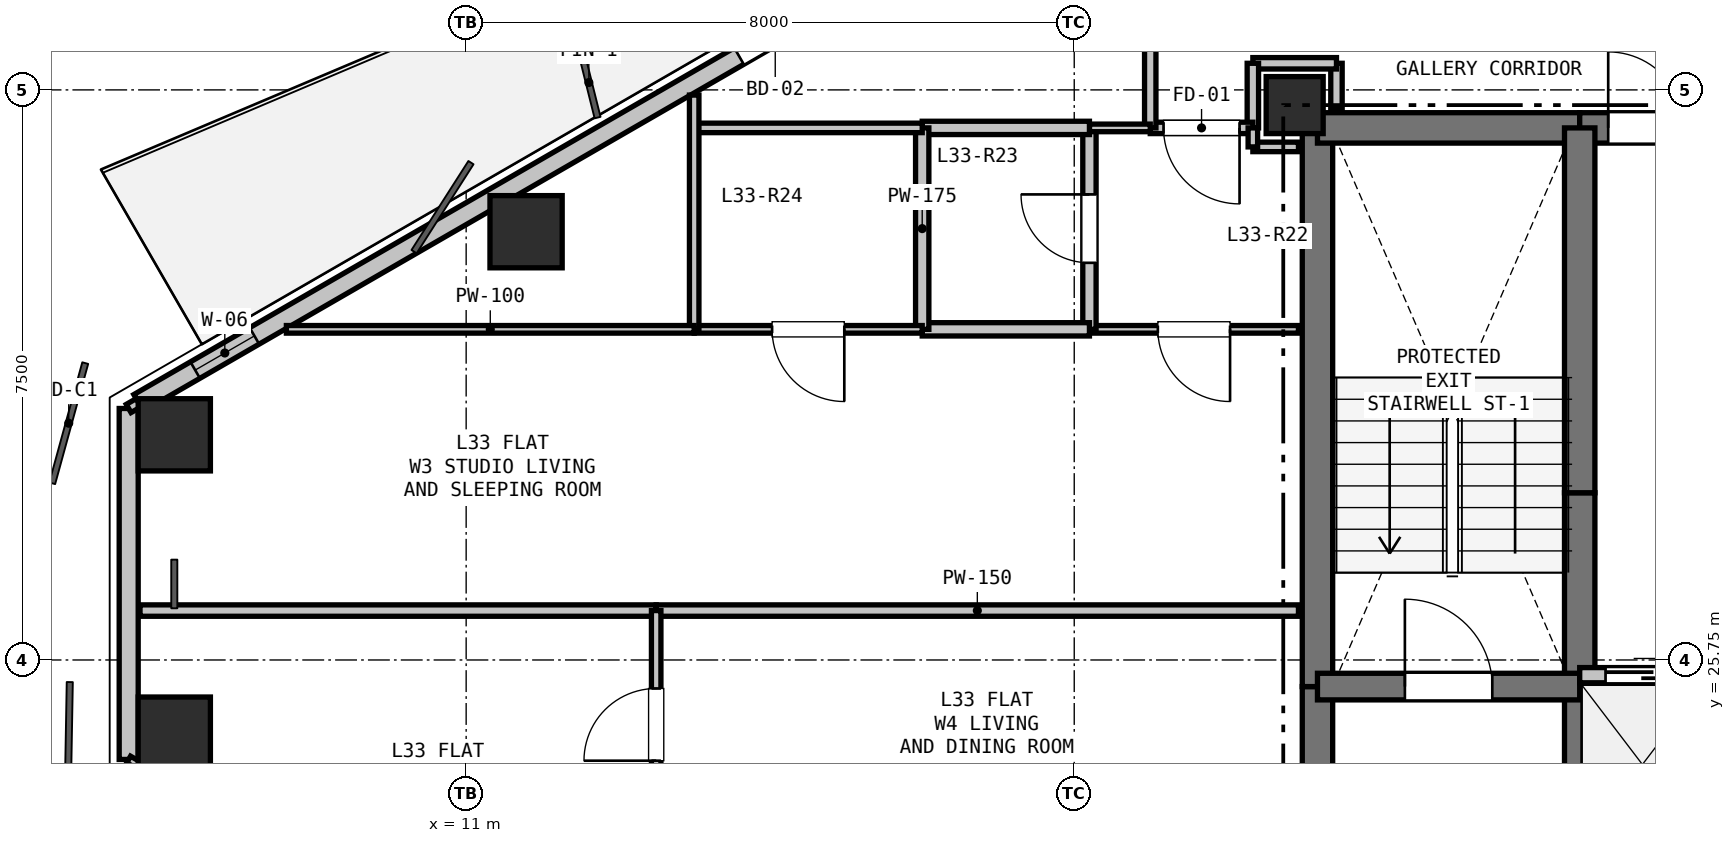
"""IFC4 building model, lengths in metres.
Left out: names, types, materials, properties, quantities, classifications, styles, units other than length and angle.
Written with IfcOpenShell. Run it as: python <this file> out.ifc"""

import sys

from ifc_helpers import new_model, si_unit, direction, frame, frame_2d, origin, origin_2d, place, context, subcontext, project, spatial, rectangle, hollow_rectangle, extrude, element, fill, save


model = new_model("IFC4")
c1 = context("Model", 3, precision=1e-05, world=origin(), true_north=direction((0.0, 1.0)))
c2 = subcontext(c1, "Body", "Model", "MODEL_VIEW")
j1 = project(units=[si_unit("LENGTHUNIT", "METRE"), si_unit("PLANEANGLEUNIT", "RADIAN")], contexts=[c1])
p1 = place(None, origin())
s1 = spatial("IfcSite", under=j1, at=p1, CompositionType="ELEMENT")
p2 = place(p1, origin())
s2 = spatial("IfcBuilding", under=s1, at=p2, CompositionType="ELEMENT")
p3 = place(p2, frame((0.0, 0.0, 121.2)))
s3 = spatial("IfcBuildingStorey", under=s2, at=p3, CompositionType="ELEMENT", Elevation=121.2)
p4 = place(p3, frame((21.9, 33.05, 0.0), z_axis=(0.0, 0.0, 1.0), x_axis=(1.0, 0.0, 0.0)))
e1 = element("IfcColumn", 1, at=p4, inside=s3, PredefinedType="COLUMN", context=c2, shape_type="SweptSolid", body=[
    extrude(rectangle(XDim=0.75, YDim=0.75, at=origin_2d()), origin(), (0.0, 0.0, 1.0), 3.3),
])
for number, where, z_axis, x_axis in (
    (2, (7.16, 28.712, -0.24), (0.0, 0.0, 1.0), (1.0, 0.0, 0.0)),
    (3, (11.788, 31.384, -0.24), (0.0, 0.0, 1.0), (1.0, 0.0, 0.0)),
    (4, (7.16, 24.788, -0.24), (0.0, 0.0, 1.0), (1.0, 0.0, 0.0)),
):
    element("IfcColumn", number, at=place(p3, frame(where, z_axis=z_axis, x_axis=x_axis)), inside=s3, PredefinedType="COLUMN", context=c2, shape_type="SweptSolid", body=[
        extrude(hollow_rectangle(XDim=0.95, YDim=0.95, WallThickness=0.028, at=origin_2d()), origin(), (0.0, 0.0, 1.0), 3.54),
    ])
p5 = place(p3, frame((6.56, 24.441, 0.0), z_axis=(0.0, 0.0, 1.0), x_axis=(0.0, 1.0, 0.0)))
e5 = element("IfcWall", 5, at=p5, inside=s3, PredefinedType="SOLIDWALL", context=c2, shape_type="SweptSolid", body=[
    extrude(rectangle(XDim=4.617, YDim=0.25, at=frame_2d((2.309, 0.0))), origin(), (0.0, 0.0, 1.0), 2.68),
])
p6 = place(p3, frame((6.69, 29.134, 0.0), z_axis=(0.0, 0.0, 1.0), x_axis=(0.866027848477, 0.499995765644, 0.0)))
e6 = element("IfcWall", 6, at=p6, inside=s3, PredefinedType="SOLIDWALL", context=c2, shape_type="SweptSolid", body=[
    extrude(rectangle(XDim=11.186, YDim=0.25, at=frame_2d((5.593, 0.0))), origin(), (0.0, 0.0, 1.0), 2.68),
])
p7 = place(p6, frame((9.122, 0.0, 0.0)))
e7 = element("IfcOpeningElement", 7, at=p7, cuts=e6, PredefinedType="OPENING", context=c2, shape_type="SweptSolid", body=[
    extrude(rectangle(XDim=1.1, YDim=2.1, at=frame_2d((0.55, 1.05))), frame((0.0, 0.135, 0.0), z_axis=(0.0, -1.0, 0.0), x_axis=(1.0, 0.0, 0.0)), (0.0, 0.0, 1.0), 0.27),
])
p8 = place(p6, frame((0.86, 0.0, 0.9)))
e8 = element("IfcOpeningElement", 8, at=p8, cuts=e6, PredefinedType="OPENING", context=c2, shape_type="SweptSolid", body=[
    extrude(rectangle(XDim=0.9, YDim=1.4, at=frame_2d((0.45, 0.7))), frame((0.0, 0.135, 0.0), z_axis=(0.0, -1.0, 0.0), x_axis=(1.0, 0.0, 0.0)), (0.0, 0.0, 1.0), 0.27),
])
p9 = place(p3, frame((16.378, 18.773, 0.0), z_axis=(0.0, 0.0, 1.0), x_axis=(-0.866027848477, 0.499995765644, 0.0)))
e9 = element("IfcWall", 9, at=p9, inside=s3, PredefinedType="SOLIDWALL", context=c2, shape_type="SweptSolid", body=[
    extrude(rectangle(XDim=11.186, YDim=0.25, at=frame_2d((5.593, 0.0))), origin(), (0.0, 0.0, 1.0), 2.68),
])
p10 = place(p9, frame((6.757, 0.0, 0.9)))
e10 = element("IfcOpeningElement", 10, at=p10, cuts=e9, PredefinedType="OPENING", context=c2, shape_type="SweptSolid", body=[
    extrude(rectangle(XDim=1.2, YDim=1.4, at=frame_2d((0.6, 0.7))), frame((0.0, 0.135, 0.0), z_axis=(0.0, -1.0, 0.0), x_axis=(1.0, 0.0, 0.0)), (0.0, 0.0, 1.0), 0.27),
])
p11 = place(p3, frame((22.2, 20.75, 0.0), z_axis=(0.0, 0.0, 1.0), x_axis=(0.0, 1.0, 0.0)))
e11 = element("IfcWall", 11, at=p11, inside=s3, PredefinedType="SHEAR", context=c2, shape_type="SweptSolid", body=[
    extrude(rectangle(XDim=4.65, YDim=0.4, at=frame_2d((2.325, 0.0))), origin(), (0.0, 0.0, 1.0), 3.06),
])
p12 = place(p3, frame((22.2, 25.4, 0.0), z_axis=(0.0, 0.0, 1.0), x_axis=(0.0, 1.0, 0.0)))
e12 = element("IfcWall", 12, at=p12, inside=s3, PredefinedType="SHEAR", context=c2, shape_type="SweptSolid", body=[
    extrude(rectangle(XDim=7.35, YDim=0.4, at=frame_2d((3.675, 0.0))), origin(), (0.0, 0.0, 1.0), 3.06),
])
p13 = place(p3, frame((22.2, 32.75, 0.0), z_axis=(0.0, 0.0, 1.0), x_axis=(1.0, 0.0, 0.0)))
e13 = element("IfcWall", 13, at=p13, inside=s3, PredefinedType="SHEAR", context=c2, shape_type="SweptSolid", body=[
    extrude(rectangle(XDim=3.45, YDim=0.4, at=frame_2d((1.725, 0.0))), origin(), (0.0, 0.0, 1.0), 3.06),
])
p14 = place(p3, frame((25.65, 32.75, 0.0), z_axis=(0.0, 0.0, 1.0), x_axis=(1.0, 0.0, 0.0)))
e14 = element("IfcWall", 14, at=p14, inside=s3, PredefinedType="SHEAR", context=c2, shape_type="SweptSolid", body=[
    extrude(rectangle(XDim=1.75, YDim=0.4, at=frame_2d((0.875, 0.0))), origin(), (0.0, 0.0, 1.0), 3.06),
])
p15 = place(p14, frame((0.375, 0.0, 0.0)))
e15 = element("IfcOpeningElement", 15, at=p15, cuts=e14, PredefinedType="OPENING", context=c2, shape_type="SweptSolid", body=[
    extrude(rectangle(XDim=1.0, YDim=2.15, at=frame_2d((0.5, 1.075))), frame((0.0, 0.21, 0.0), z_axis=(0.0, -1.0, 0.0), x_axis=(1.0, 0.0, 0.0)), (0.0, 0.0, 1.0), 0.42),
])
p16 = place(p3, frame((25.65, 22.75, 0.0), z_axis=(0.0, 0.0, 1.0), x_axis=(0.0, 1.0, 0.0)))
e16 = element("IfcWall", 16, at=p16, inside=s3, PredefinedType="SHEAR", context=c2, shape_type="SweptSolid", body=[
    extrude(rectangle(XDim=2.8, YDim=0.4, at=frame_2d((1.4, 0.0))), origin(), (0.0, 0.0, 1.0), 3.06),
])
p17 = place(p3, frame((25.65, 25.55, 0.0), z_axis=(0.0, 0.0, 1.0), x_axis=(0.0, 1.0, 0.0)))
e17 = element("IfcWall", 17, at=p17, inside=s3, PredefinedType="SHEAR", context=c2, shape_type="SweptSolid", body=[
    extrude(rectangle(XDim=2.4, YDim=0.4, at=frame_2d((1.2, 0.0))), origin(), (0.0, 0.0, 1.0), 3.06),
])
p18 = place(p3, frame((25.65, 27.95, 0.0), z_axis=(0.0, 0.0, 1.0), x_axis=(0.0, 1.0, 0.0)))
e18 = element("IfcWall", 18, at=p18, inside=s3, PredefinedType="SHEAR", context=c2, shape_type="SweptSolid", body=[
    extrude(rectangle(XDim=4.8, YDim=0.4, at=frame_2d((2.4, 0.0))), origin(), (0.0, 0.0, 1.0), 3.06),
])
p19 = place(p3, frame((22.2, 25.4, 0.0), z_axis=(0.0, 0.0, 1.0), x_axis=(1.0, 0.0, 0.0)))
e19 = element("IfcWall", 19, at=p19, inside=s3, PredefinedType="SHEAR", context=c2, shape_type="SweptSolid", body=[
    extrude(rectangle(XDim=3.45, YDim=0.35, at=frame_2d((1.725, 0.0))), origin(), (0.0, 0.0, 1.0), 3.06),
])
p20 = place(p19, frame((1.15, 0.0, 0.0)))
e20 = element("IfcOpeningElement", 20, at=p20, cuts=e19, PredefinedType="OPENING", context=c2, shape_type="SweptSolid", body=[
    extrude(rectangle(XDim=1.15, YDim=2.15, at=frame_2d((0.575, 1.075))), frame((0.0, 0.185, 0.0), z_axis=(0.0, -1.0, 0.0), x_axis=(1.0, 0.0, 0.0)), (0.0, 0.0, 1.0), 0.37),
])
p21 = place(p3, frame((25.65, 25.55, 0.0), z_axis=(0.0, 0.0, 1.0), x_axis=(1.0, 0.0, 0.0)))
e21 = element("IfcWall", 21, at=p21, inside=s3, PredefinedType="PARTITIONING", context=c2, shape_type="SweptSolid", body=[
    extrude(rectangle(XDim=4.95, YDim=0.2, at=frame_2d((2.475, 0.0))), origin(), (0.0, 0.0, 1.0), 3.06),
])
p22 = place(p21, frame((0.34, 0.0, 0.0)))
e22 = element("IfcOpeningElement", 22, at=p22, cuts=e21, PredefinedType="OPENING", context=c2, shape_type="SweptSolid", body=[
    extrude(rectangle(XDim=1.1, YDim=2.15, at=frame_2d((0.55, 1.075))), frame((0.0, 0.11, 0.0), z_axis=(0.0, -1.0, 0.0), x_axis=(1.0, 0.0, 0.0)), (0.0, 0.0, 1.0), 0.22),
])
p23 = place(p21, frame((1.99, 0.0, 0.0)))
e23 = element("IfcOpeningElement", 23, at=p23, cuts=e21, PredefinedType="OPENING", context=c2, shape_type="SweptSolid", body=[
    extrude(rectangle(XDim=1.1, YDim=2.15, at=frame_2d((0.55, 1.075))), frame((0.0, 0.11, 0.0), z_axis=(0.0, -1.0, 0.0), x_axis=(1.0, 0.0, 0.0)), (0.0, 0.0, 1.0), 0.22),
])
p24 = place(p21, frame((3.64, 0.0, 0.0)))
e24 = element("IfcOpeningElement", 24, at=p24, cuts=e21, PredefinedType="OPENING", context=c2, shape_type="SweptSolid", body=[
    extrude(rectangle(XDim=1.1, YDim=2.15, at=frame_2d((0.55, 1.075))), frame((0.0, 0.11, 0.0), z_axis=(0.0, -1.0, 0.0), x_axis=(1.0, 0.0, 0.0)), (0.0, 0.0, 1.0), 0.22),
])
p25 = place(p3, frame((22.45, 33.0, 0.0), z_axis=(0.0, 0.0, 1.0), x_axis=(0.0, 1.0, 0.0)))
e25 = element("IfcWall", 25, at=p25, inside=s3, PredefinedType="PARTITIONING", context=c2, shape_type="SweptSolid", body=[
    extrude(rectangle(XDim=0.6, YDim=0.15, at=frame_2d((0.3, 0.0))), origin(), (0.0, 0.0, 1.0), 2.508),
])
p26 = place(p3, frame((22.45, 33.6, 0.0), z_axis=(0.0, 0.0, 1.0), x_axis=(-1.0, 0.0, 0.0)))
e26 = element("IfcWall", 26, at=p26, inside=s3, PredefinedType="PARTITIONING", context=c2, shape_type="SweptSolid", body=[
    extrude(rectangle(XDim=1.1, YDim=0.15, at=frame_2d((0.55, 0.0))), origin(), (0.0, 0.0, 1.0), 3.06),
])
p27 = place(p3, frame((21.35, 33.6, 0.0), z_axis=(0.0, 0.0, 1.0), x_axis=(0.0, -1.0, 0.0)))
e27 = element("IfcWall", 27, at=p27, inside=s3, PredefinedType="PARTITIONING", context=c2, shape_type="SweptSolid", body=[
    extrude(rectangle(XDim=0.85, YDim=0.15, at=frame_2d((0.425, 0.0))), origin(), (0.0, 0.0, 1.0), 2.433),
])
p28 = place(p3, frame((21.35, 32.75, 0.0), z_axis=(0.0, 0.0, 1.0), x_axis=(-1.0, 0.0, 0.0)))
e28 = element("IfcWall", 28, at=p28, inside=s3, PredefinedType="PARTITIONING", context=c2, shape_type="SweptSolid", body=[
    extrude(rectangle(XDim=1.35, YDim=0.15, at=frame_2d((0.675, 0.0))), origin(), (0.0, 0.0, 1.0), 2.433),
])
p29 = place(p28, frame((0.175, 0.0, 0.0)))
e29 = element("IfcOpeningElement", 29, at=p29, cuts=e28, PredefinedType="OPENING", context=c2, shape_type="SweptSolid", body=[
    extrude(rectangle(XDim=1.0, YDim=2.15, at=frame_2d((0.5, 1.075))), frame((0.0, 0.085, 0.0), z_axis=(0.0, -1.0, 0.0), x_axis=(1.0, 0.0, 0.0)), (0.0, 0.0, 1.0), 0.17),
])
p30 = place(p3, frame((20.0, 32.75, 0.0), z_axis=(0.0, 0.0, 1.0), x_axis=(0.0, 1.0, 0.0)))
e30 = element("IfcWall", 30, at=p30, inside=s3, PredefinedType="PARTITIONING", context=c2, shape_type="SweptSolid", body=[
    extrude(rectangle(XDim=2.6, YDim=0.15, at=frame_2d((1.3, 0.0))), origin(), (0.0, 0.0, 1.0), 2.433),
])
p31 = place(p3, frame((21.35, 32.5, 0.0), z_axis=(0.0, 0.0, 1.0), x_axis=(1.0, 0.0, 0.0)))
e31 = element("IfcWall", 31, at=p31, inside=s3, PredefinedType="PARTITIONING", context=c2, shape_type="SweptSolid", body=[
    extrude(rectangle(XDim=0.6, YDim=0.125, at=frame_2d((0.3, 0.0))), origin(), (0.0, 0.0, 1.0), 2.508),
])
p32 = place(p3, frame((21.95, 30.1, 0.0), z_axis=(0.0, 0.0, 1.0), x_axis=(-1.0, 0.0, 0.0)))
e32 = element("IfcWall", 32, at=p32, inside=s3, PredefinedType="PARTITIONING", context=c2, shape_type="SweptSolid", body=[
    extrude(rectangle(XDim=2.75, YDim=0.1, at=frame_2d((1.375, 0.0))), origin(), (0.0, 0.0, 1.0), 2.508),
])
p33 = place(p32, frame((0.9, 0.0, 0.0)))
e33 = element("IfcOpeningElement", 33, at=p33, cuts=e32, PredefinedType="OPENING", context=c2, shape_type="SweptSolid", body=[
    extrude(rectangle(XDim=0.95, YDim=2.1, at=frame_2d((0.475, 1.05))), frame((0.0, 0.06, 0.0), z_axis=(0.0, -1.0, 0.0), x_axis=(1.0, 0.0, 0.0)), (0.0, 0.0, 1.0), 0.12),
])
p34 = place(p3, frame((19.2, 30.1, 0.0), z_axis=(0.0, 0.0, 1.0), x_axis=(0.0, 1.0, 0.0)))
e34 = element("IfcWall", 34, at=p34, inside=s3, PredefinedType="PLUMBINGWALL", context=c2, shape_type="SweptSolid", body=[
    extrude(rectangle(XDim=2.65, YDim=0.175, at=frame_2d((1.325, 0.0))), origin(), (0.0, 0.0, 1.0), 2.433),
])
p35 = place(p34, frame((0.875, 0.0, 0.0)))
e35 = element("IfcOpeningElement", 35, at=p35, cuts=e34, PredefinedType="OPENING", context=c2, shape_type="SweptSolid", body=[
    extrude(rectangle(XDim=0.9, YDim=2.1, at=frame_2d((0.45, 1.05))), frame((0.0, 0.097, 0.0), z_axis=(0.0, -1.0, 0.0), x_axis=(1.0, 0.0, 0.0)), (0.0, 0.0, 1.0), 0.195),
])
p36 = place(p3, frame((19.2, 32.75, 0.0), z_axis=(0.0, 0.0, 1.0), x_axis=(1.0, 0.0, 0.0)))
e36 = element("IfcWall", 36, at=p36, inside=s3, PredefinedType="PARTITIONING", context=c2, shape_type="SweptSolid", body=[
    extrude(rectangle(XDim=0.8, YDim=0.1, at=frame_2d((0.4, 0.0))), origin(), (0.0, 0.0, 1.0), 2.433),
])
p37 = place(p3, frame((21.35, 32.75, 0.0), z_axis=(0.0, 0.0, 1.0), x_axis=(0.0, -1.0, 0.0)))
e37 = element("IfcWall", 37, at=p37, inside=s3, PredefinedType="PARTITIONING", context=c2, shape_type="SweptSolid", body=[
    extrude(rectangle(XDim=0.25, YDim=0.125, at=frame_2d((0.125, 0.0))), origin(), (0.0, 0.0, 1.0), 3.06),
])
p38 = place(p3, frame((17.0, 32.75, 0.0), z_axis=(0.0, 0.0, 1.0), x_axis=(1.0, 0.0, 0.0)))
e38 = element("IfcWall", 38, at=p38, inside=s3, PredefinedType="PLUMBINGWALL", context=c2, shape_type="SweptSolid", body=[
    extrude(rectangle(XDim=2.2, YDim=0.175, at=frame_2d((1.1, 0.0))), origin(), (0.0, 0.0, 1.0), 2.433),
])
p39 = place(p3, frame((19.2, 30.1, 0.0), z_axis=(0.0, 0.0, 1.0), x_axis=(-1.0, 0.0, 0.0)))
e39 = element("IfcWall", 39, at=p39, inside=s3, PredefinedType="PLUMBINGWALL", context=c2, shape_type="SweptSolid", body=[
    extrude(rectangle(XDim=2.2, YDim=0.175, at=frame_2d((1.1, 0.0))), origin(), (0.0, 0.0, 1.0), 3.06),
])
p40 = place(p3, frame((17.0, 30.1, 0.0), z_axis=(0.0, 0.0, 1.0), x_axis=(0.0, 1.0, 0.0)))
e40 = element("IfcWall", 40, at=p40, inside=s3, PredefinedType="PLUMBINGWALL", context=c2, shape_type="SweptSolid", body=[
    extrude(rectangle(XDim=2.65, YDim=0.175, at=frame_2d((1.325, 0.0))), origin(), (0.0, 0.0, 1.0), 2.433),
])
p41 = place(p3, frame((14.0, 32.75, 0.0), z_axis=(0.0, 0.0, 1.0), x_axis=(1.0, 0.0, 0.0)))
e41 = element("IfcWall", 41, at=p41, inside=s3, PredefinedType="PARTITIONING", context=c2, shape_type="SweptSolid", body=[
    extrude(rectangle(XDim=3.0, YDim=0.125, at=frame_2d((1.5, 0.0))), origin(), (0.0, 0.0, 1.0), 2.365),
])
p42 = place(p3, frame((17.0, 30.1, 0.0), z_axis=(0.0, 0.0, 1.0), x_axis=(-1.0, 0.0, 0.0)))
e42 = element("IfcWall", 42, at=p42, inside=s3, PredefinedType="PARTITIONING", context=c2, shape_type="SweptSolid", body=[
    extrude(rectangle(XDim=3.0, YDim=0.1, at=frame_2d((1.5, 0.0))), origin(), (0.0, 0.0, 1.0), 3.06),
])
p43 = place(p42, frame((1.025, 0.0, 0.0)))
e43 = element("IfcOpeningElement", 43, at=p43, cuts=e42, PredefinedType="OPENING", context=c2, shape_type="SweptSolid", body=[
    extrude(rectangle(XDim=0.95, YDim=2.1, at=frame_2d((0.475, 1.05))), frame((0.0, 0.06, 0.0), z_axis=(0.0, -1.0, 0.0), x_axis=(1.0, 0.0, 0.0)), (0.0, 0.0, 1.0), 0.12),
])
p44 = place(p3, frame((14.0, 30.1, 0.0), z_axis=(0.0, 0.0, 1.0), x_axis=(0.0, 1.0, 0.0)))
e44 = element("IfcWall", 44, at=p44, inside=s3, PredefinedType="PARTITIONING", context=c2, shape_type="SweptSolid", body=[
    extrude(rectangle(XDim=3.082, YDim=0.125, at=frame_2d((1.541, 0.0))), origin(), (0.0, 0.0, 1.0), 2.365),
])
p45 = place(p3, frame((8.635, 30.1, 0.0), z_axis=(0.0, 0.0, 1.0), x_axis=(1.0, 0.0, 0.0)))
e45 = element("IfcWall", 45, at=p45, inside=s3, PredefinedType="PARTITIONING", context=c2, shape_type="SweptSolid", body=[
    extrude(rectangle(XDim=5.365, YDim=0.1, at=frame_2d((2.683, 0.0))), origin(), (0.0, 0.0, 1.0), 2.725),
])
p46 = place(p3, frame((21.95, 26.4, 0.0), z_axis=(0.0, 0.0, 1.0), x_axis=(-1.0, 0.0, 0.0)))
e46 = element("IfcWall", 46, at=p46, inside=s3, PredefinedType="PARTITIONING", context=c2, shape_type="SweptSolid", body=[
    extrude(rectangle(XDim=8.45, YDim=0.15, at=frame_2d((4.225, 0.0))), origin(), (0.0, 0.0, 1.0), 2.508),
])
p47 = place(p3, frame((13.5, 26.4, 0.0), z_axis=(0.0, 0.0, 1.0), x_axis=(-1.0, 0.0, 0.0)))
e47 = element("IfcWall", 47, at=p47, inside=s3, PredefinedType="PARTITIONING", context=c2, shape_type="SweptSolid", body=[
    extrude(rectangle(XDim=6.791, YDim=0.15, at=frame_2d((3.396, 0.0))), origin(), (0.0, 0.0, 1.0), 2.725),
])
p48 = place(p3, frame((6.56, 29.059, 0.0), z_axis=(0.0, 0.0, 1.0), x_axis=(0.866131372301, 0.499816412211, 0.0)))
e48 = element("IfcWall", 48, at=p48, inside=s3, PredefinedType="PARTITIONING", context=c2, shape_type="SweptSolid", body=[
    extrude(rectangle(XDim=0.15, YDim=0.125, at=frame_2d((0.075, 0.0))), origin(), (0.0, 0.0, 1.0), 3.06),
])
p49 = place(p3, frame((13.5, 23.4, 0.0), z_axis=(0.0, 0.0, 1.0), x_axis=(0.0, 1.0, 0.0)))
e49 = element("IfcWall", 49, at=p49, inside=s3, PredefinedType="PARTITIONING", context=c2, shape_type="SweptSolid", body=[
    extrude(rectangle(XDim=3.0, YDim=0.125, at=frame_2d((1.5, 0.0))), origin(), (0.0, 0.0, 1.0), 3.06),
])
p50 = place(p49, frame((1.025, 0.0, 0.0)))
e50 = element("IfcOpeningElement", 50, at=p50, cuts=e49, PredefinedType="OPENING", context=c2, shape_type="SweptSolid", body=[
    extrude(rectangle(XDim=0.95, YDim=2.1, at=frame_2d((0.475, 1.05))), frame((0.0, 0.073, 0.0), z_axis=(0.0, -1.0, 0.0), x_axis=(1.0, 0.0, 0.0)), (0.0, 0.0, 1.0), 0.145),
])
p51 = place(p3, frame((6.69, 24.366, 0.0), z_axis=(0.0, 0.0, 1.0), x_axis=(-0.866131372301, 0.499816412211, 0.0)))
e51 = element("IfcWall", 51, at=p51, inside=s3, PredefinedType="PARTITIONING", context=c2, shape_type="SweptSolid", body=[
    extrude(rectangle(XDim=0.15, YDim=0.1, at=frame_2d((0.075, 0.0))), origin(), (0.0, 0.0, 1.0), 3.06),
])
p52 = place(p7, origin())
e52 = element("IfcDoor", 52, at=p52, inside=s3, OperationType="SINGLE_SWING_RIGHT", PredefinedType="DOOR", context=c2, shape_type="SweptSolid", body=[
    extrude(rectangle(XDim=1.1, YDim=2.1, at=frame_2d((0.55, 1.05))), frame((0.0, 0.025, 0.0), z_axis=(0.0, -1.0, 0.0), x_axis=(1.0, 0.0, 0.0)), (0.0, 0.0, 1.0), 0.05),
])
fill(e7, e52)
p53 = place(p8, origin())
e53 = element("IfcWindow", 53, at=p53, inside=s3, PartitioningType="SINGLE_PANEL", PredefinedType="WINDOW", context=c2, shape_type="SweptSolid", body=[
    extrude(rectangle(XDim=0.9, YDim=1.4, at=frame_2d((0.45, 0.7))), frame((0.0, 0.03, 0.0), z_axis=(0.0, -1.0, 0.0), x_axis=(1.0, 0.0, 0.0)), (0.0, 0.0, 1.0), 0.06),
])
fill(e8, e53)
p54 = place(p22, origin())
e54 = element("IfcDoor", 54, at=p54, inside=s3, OperationType="SLIDING_TO_LEFT", PredefinedType="DOOR", context=c2, shape_type="SweptSolid", body=[
    extrude(rectangle(XDim=1.1, YDim=2.15, at=frame_2d((0.55, 1.075))), frame((0.0, 0.025, 0.0), z_axis=(0.0, -1.0, 0.0), x_axis=(1.0, 0.0, 0.0)), (0.0, 0.0, 1.0), 0.05),
])
fill(e22, e54)
p55 = place(p15, origin())
e55 = element("IfcDoor", 55, at=p55, inside=s3, OperationType="SINGLE_SWING_LEFT", PredefinedType="DOOR", context=c2, shape_type="SweptSolid", body=[
    extrude(rectangle(XDim=1.0, YDim=2.15, at=frame_2d((0.5, 1.075))), frame((0.0, 0.025, 0.0), z_axis=(0.0, -1.0, 0.0), x_axis=(1.0, 0.0, 0.0)), (0.0, 0.0, 1.0), 0.05),
])
fill(e15, e55)
p56 = place(p20, origin())
e56 = element("IfcDoor", 56, at=p56, inside=s3, OperationType="SINGLE_SWING_LEFT", PredefinedType="DOOR", context=c2, shape_type="SweptSolid", body=[
    extrude(rectangle(XDim=1.15, YDim=2.15, at=frame_2d((0.575, 1.075))), frame((0.0, 0.025, 0.0), z_axis=(0.0, -1.0, 0.0), x_axis=(1.0, 0.0, 0.0)), (0.0, 0.0, 1.0), 0.05),
])
fill(e20, e56)
p57 = place(p29, origin())
e57 = element("IfcDoor", 57, at=p57, inside=s3, OperationType="SINGLE_SWING_LEFT", PredefinedType="DOOR", context=c2, shape_type="SweptSolid", body=[
    extrude(rectangle(XDim=1.0, YDim=2.15, at=frame_2d((0.5, 1.075))), frame((0.0, 0.025, 0.0), z_axis=(0.0, -1.0, 0.0), x_axis=(1.0, 0.0, 0.0)), (0.0, 0.0, 1.0), 0.05),
])
fill(e29, e57)
p58 = place(p35, origin())
e58 = element("IfcDoor", 58, at=p58, inside=s3, OperationType="SINGLE_SWING_RIGHT", PredefinedType="DOOR", context=c2, shape_type="SweptSolid", body=[
    extrude(rectangle(XDim=0.9, YDim=2.1, at=frame_2d((0.45, 1.05))), frame((0.0, 0.025, 0.0), z_axis=(0.0, -1.0, 0.0), x_axis=(1.0, 0.0, 0.0)), (0.0, 0.0, 1.0), 0.05),
])
fill(e35, e58)
p59 = place(p33, origin())
e59 = element("IfcDoor", 59, at=p59, inside=s3, OperationType="SINGLE_SWING_LEFT", PredefinedType="DOOR", context=c2, shape_type="SweptSolid", body=[
    extrude(rectangle(XDim=0.95, YDim=2.1, at=frame_2d((0.475, 1.05))), frame((0.0, 0.025, 0.0), z_axis=(0.0, -1.0, 0.0), x_axis=(1.0, 0.0, 0.0)), (0.0, 0.0, 1.0), 0.05),
])
fill(e33, e59)
p60 = place(p43, origin())
e60 = element("IfcDoor", 60, at=p60, inside=s3, OperationType="SINGLE_SWING_LEFT", PredefinedType="DOOR", context=c2, shape_type="SweptSolid", body=[
    extrude(rectangle(XDim=0.95, YDim=2.1, at=frame_2d((0.475, 1.05))), frame((0.0, 0.025, 0.0), z_axis=(0.0, -1.0, 0.0), x_axis=(1.0, 0.0, 0.0)), (0.0, 0.0, 1.0), 0.05),
])
fill(e43, e60)
p61 = place(p50, origin())
e61 = element("IfcDoor", 61, at=p61, inside=s3, OperationType="SINGLE_SWING_LEFT", PredefinedType="DOOR", context=c2, shape_type="SweptSolid", body=[
    extrude(rectangle(XDim=0.95, YDim=2.1, at=frame_2d((0.475, 1.05))), frame((0.0, 0.025, 0.0), z_axis=(0.0, -1.0, 0.0), x_axis=(1.0, 0.0, 0.0)), (0.0, 0.0, 1.0), 0.05),
])
fill(e50, e61)
save(model, sys.argv[1])
